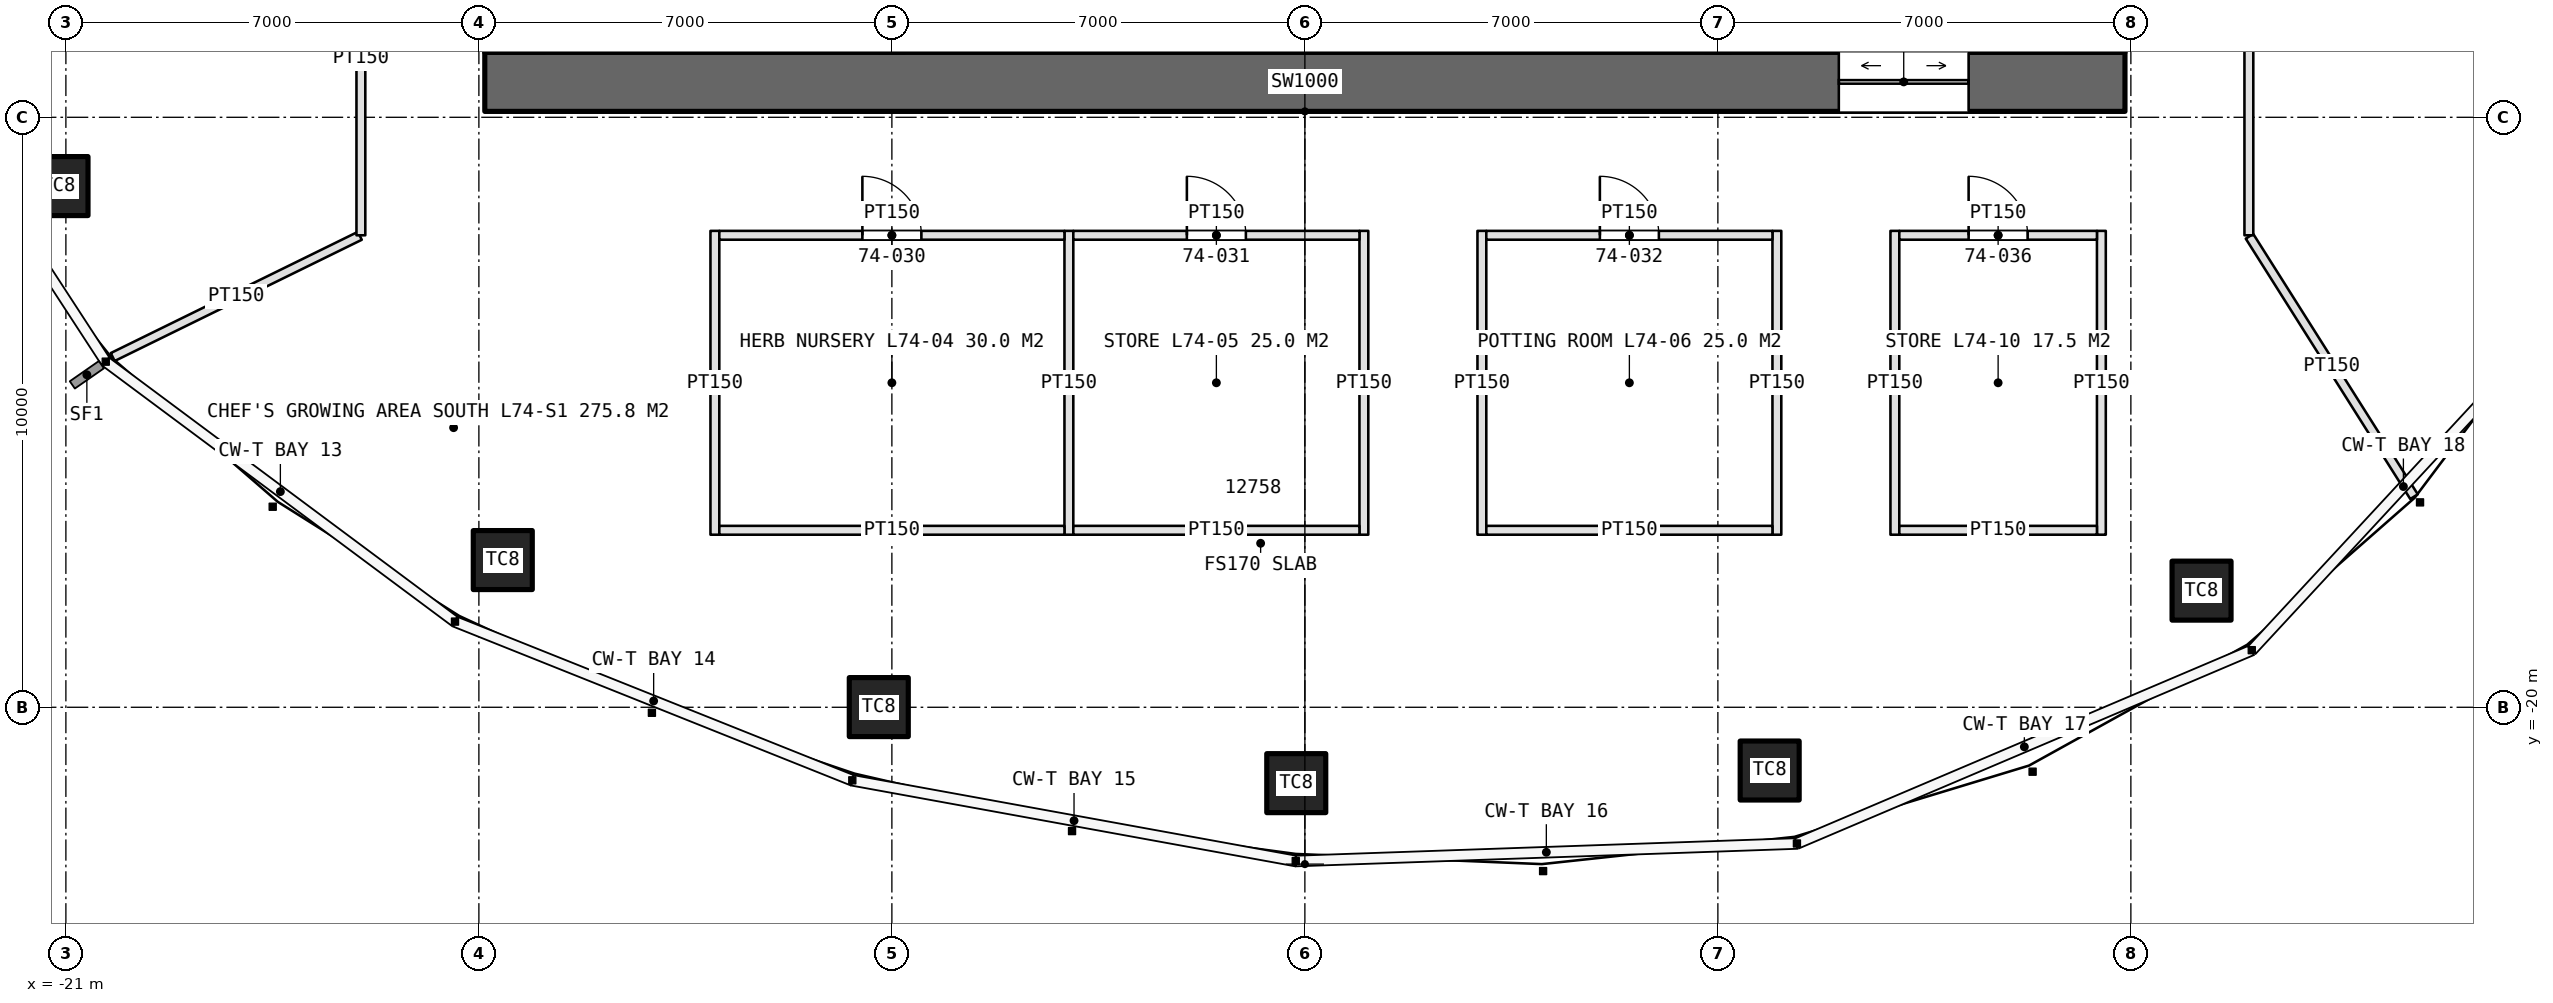
"""IFC4 building model, lengths in metres.
Left out: names, types, materials, properties, quantities, classifications, styles, units other than length and angle.
Written with IfcOpenShell. Run it as: python <this file> out.ifc"""

import sys

from ifc_helpers import new_model, si_unit, direction, frame, frame_2d, origin, origin_2d, place, context, subcontext, project, spatial, rectangle, extrude, element, fill, save


model = new_model("IFC4")
c1 = context("Model", 3, precision=1e-05, world=origin(), true_north=direction((0.0, 1.0)))
c2 = subcontext(c1, "Body", "Model", "MODEL_VIEW")
j1 = project(units=[si_unit("LENGTHUNIT", "METRE"), si_unit("PLANEANGLEUNIT", "RADIAN")], contexts=[c1])
p1 = place(None, origin())
s1 = spatial("IfcSite", under=j1, at=p1, CompositionType="ELEMENT")
p2 = place(p1, origin())
s2 = spatial("IfcBuilding", under=s1, at=p2, CompositionType="ELEMENT")
p3 = place(p2, frame((0.0, 0.0, 330.0)))
s3 = spatial("IfcBuildingStorey", under=s2, at=p3, CompositionType="ELEMENT", Elevation=330.0)
p4 = place(p3, frame((-13.9, -9.4, 0.0), z_axis=(0.0, 0.0, 1.0), x_axis=(1.0, 0.0, 0.0)))
e1 = element("IfcWall", 1, at=p4, inside=s3, PredefinedType="SHEAR", context=c2, shape_type="SweptSolid", body=[
    extrude(rectangle(XDim=27.8, YDim=1.0, at=frame_2d((13.9, 0.0))), origin(), (0.0, 0.0, 1.0), 4.2),
])
p5 = place(p4, frame((22.95, 0.0, 0.0)))
e2 = element("IfcOpeningElement", 2, at=p5, cuts=e1, PredefinedType="OPENING", context=c2, shape_type="SweptSolid", body=[
    extrude(rectangle(XDim=2.2, YDim=2.7, at=frame_2d((1.1, 1.35))), frame((0.0, 0.51, 0.0), z_axis=(0.0, -1.0, 0.0), x_axis=(1.0, 0.0, 0.0)), (0.0, 0.0, 1.0), 1.02),
])
for number, where, z_axis, x_axis in (
    (3, (-21.125, -11.166, 0.0), (0.0, 0.0, 1.0), (1.0, 0.0, 0.0)),
    (4, (-13.595, -17.505, 0.0), (0.0, 0.0, 1.0), (1.0, 0.0, 0.0)),
    (5, (-7.222, -19.997, 0.0), (0.0, 0.0, 1.0), (1.0, 0.0, 0.0)),
    (6, (-0.146, -21.286, 0.0), (0.0, 0.0, 1.0), (1.0, 0.0, 0.0)),
    (7, (7.878, -21.072, 0.0), (0.0, 0.0, 1.0), (1.0, 0.0, 0.0)),
    (8, (15.198, -18.023, 0.0), (0.0, 0.0, 1.0), (1.0, 0.0, 0.0)),
):
    element("IfcColumn", number, at=place(p3, frame(where, z_axis=z_axis, x_axis=x_axis)), inside=s3, PredefinedType="COLUMN", context=c2, shape_type="SweptSolid", body=[
        extrude(rectangle(XDim=1.0, YDim=1.0, at=origin_2d()), origin(), (0.0, 0.0, 1.0), 4.2),
    ])
for number, where, z_axis, x_axis in (
    (9, (-4.2, -4.7, 0.0), (0.0, 0.0, 1.0), (0.0, -1.0, 0.0)),
    (10, (-1.4, -4.7, 0.0), (0.0, 0.0, 1.0), (0.0, -1.0, 0.0)),
    (11, (1.4, -4.7, 0.0), (0.0, 0.0, 1.0), (0.0, -1.0, 0.0)),
    (12, (4.2, -4.7, 0.0), (0.0, 0.0, 1.0), (0.0, -1.0, 0.0)),
):
    element("IfcWall", number, at=place(p3, frame(where, z_axis=z_axis, x_axis=x_axis)), inside=s3, PredefinedType="PARTITIONING", context=c2, shape_type="SweptSolid", body=[
        extrude(rectangle(XDim=4.2, YDim=0.2, at=frame_2d((2.1, 0.0))), origin(), (0.0, 0.0, 1.0), 4.2),
    ])
for number, where, z_axis, x_axis in (
    (13, (-10.0, -11.925, 0.0), (0.0, 0.0, 1.0), (0.0, -1.0, 0.0)),
    (14, (-4.0, -11.925, 0.0), (0.0, 0.0, 1.0), (0.0, -1.0, 0.0)),
    (15, (1.0, -11.925, 0.0), (0.0, 0.0, 1.0), (0.0, -1.0, 0.0)),
):
    element("IfcWall", number, at=place(p3, frame(where, z_axis=z_axis, x_axis=x_axis)), inside=s3, PredefinedType="PARTITIONING", context=c2, shape_type="SweptSolid", body=[
        extrude(rectangle(XDim=5.15, YDim=0.15, at=frame_2d((2.575, 0.0))), origin(), (0.0, 0.0, 1.0), 3.0),
    ])
p6 = place(p3, frame((-9.925, -12.0, 0.0), z_axis=(0.0, 0.0, 1.0), x_axis=(1.0, 0.0, 0.0)))
e16 = element("IfcWall", 16, at=p6, inside=s3, PredefinedType="PARTITIONING", context=c2, shape_type="SweptSolid", body=[
    extrude(rectangle(XDim=5.85, YDim=0.15, at=frame_2d((2.925, 0.0))), origin(), (0.0, 0.0, 1.0), 3.0),
])
p7 = place(p6, frame((2.425, 0.0, 0.0)))
e17 = element("IfcOpeningElement", 17, at=p7, cuts=e16, PredefinedType="OPENING", context=c2, shape_type="SweptSolid", body=[
    extrude(rectangle(XDim=1.0, YDim=2.2, at=frame_2d((0.5, 1.1))), frame((0.0, 0.085, 0.0), z_axis=(0.0, -1.0, 0.0), x_axis=(1.0, 0.0, 0.0)), (0.0, 0.0, 1.0), 0.17),
])
p8 = place(p3, frame((-9.925, -17.0, 0.0), z_axis=(0.0, 0.0, 1.0), x_axis=(1.0, 0.0, 0.0)))
e18 = element("IfcWall", 18, at=p8, inside=s3, PredefinedType="PARTITIONING", context=c2, shape_type="SweptSolid", body=[
    extrude(rectangle(XDim=5.85, YDim=0.15, at=frame_2d((2.925, 0.0))), origin(), (0.0, 0.0, 1.0), 3.0),
])
p9 = place(p3, frame((-3.925, -12.0, 0.0), z_axis=(0.0, 0.0, 1.0), x_axis=(1.0, 0.0, 0.0)))
e19 = element("IfcWall", 19, at=p9, inside=s3, PredefinedType="PARTITIONING", context=c2, shape_type="SweptSolid", body=[
    extrude(rectangle(XDim=4.85, YDim=0.15, at=frame_2d((2.425, 0.0))), origin(), (0.0, 0.0, 1.0), 3.0),
])
p10 = place(p9, frame((1.925, 0.0, 0.0)))
e20 = element("IfcOpeningElement", 20, at=p10, cuts=e19, PredefinedType="OPENING", context=c2, shape_type="SweptSolid", body=[
    extrude(rectangle(XDim=1.0, YDim=2.2, at=frame_2d((0.5, 1.1))), frame((0.0, 0.085, 0.0), z_axis=(0.0, -1.0, 0.0), x_axis=(1.0, 0.0, 0.0)), (0.0, 0.0, 1.0), 0.17),
])
p11 = place(p3, frame((-3.925, -17.0, 0.0), z_axis=(0.0, 0.0, 1.0), x_axis=(1.0, 0.0, 0.0)))
e21 = element("IfcWall", 21, at=p11, inside=s3, PredefinedType="PARTITIONING", context=c2, shape_type="SweptSolid", body=[
    extrude(rectangle(XDim=4.85, YDim=0.15, at=frame_2d((2.425, 0.0))), origin(), (0.0, 0.0, 1.0), 3.0),
])
for number, where, z_axis, x_axis in (
    (22, (3.0, -11.925, 0.0), (0.0, 0.0, 1.0), (0.0, -1.0, 0.0)),
    (23, (8.0, -11.925, 0.0), (0.0, 0.0, 1.0), (0.0, -1.0, 0.0)),
):
    element("IfcWall", number, at=place(p3, frame(where, z_axis=z_axis, x_axis=x_axis)), inside=s3, PredefinedType="PARTITIONING", context=c2, shape_type="SweptSolid", body=[
        extrude(rectangle(XDim=5.15, YDim=0.15, at=frame_2d((2.575, 0.0))), origin(), (0.0, 0.0, 1.0), 3.0),
    ])
p12 = place(p3, frame((3.075, -12.0, 0.0), z_axis=(0.0, 0.0, 1.0), x_axis=(1.0, 0.0, 0.0)))
e24 = element("IfcWall", 24, at=p12, inside=s3, PredefinedType="PARTITIONING", context=c2, shape_type="SweptSolid", body=[
    extrude(rectangle(XDim=4.85, YDim=0.15, at=frame_2d((2.425, 0.0))), origin(), (0.0, 0.0, 1.0), 3.0),
])
p13 = place(p12, frame((1.925, 0.0, 0.0)))
e25 = element("IfcOpeningElement", 25, at=p13, cuts=e24, PredefinedType="OPENING", context=c2, shape_type="SweptSolid", body=[
    extrude(rectangle(XDim=1.0, YDim=2.2, at=frame_2d((0.5, 1.1))), frame((0.0, 0.085, 0.0), z_axis=(0.0, -1.0, 0.0), x_axis=(1.0, 0.0, 0.0)), (0.0, 0.0, 1.0), 0.17),
])
p14 = place(p3, frame((3.075, -17.0, 0.0), z_axis=(0.0, 0.0, 1.0), x_axis=(1.0, 0.0, 0.0)))
e26 = element("IfcWall", 26, at=p14, inside=s3, PredefinedType="PARTITIONING", context=c2, shape_type="SweptSolid", body=[
    extrude(rectangle(XDim=4.85, YDim=0.15, at=frame_2d((2.425, 0.0))), origin(), (0.0, 0.0, 1.0), 3.0),
])
for number, where, z_axis, x_axis in (
    (27, (10.0, -11.925, 0.0), (0.0, 0.0, 1.0), (0.0, -1.0, 0.0)),
    (28, (13.5, -11.925, 0.0), (0.0, 0.0, 1.0), (0.0, -1.0, 0.0)),
):
    element("IfcWall", number, at=place(p3, frame(where, z_axis=z_axis, x_axis=x_axis)), inside=s3, PredefinedType="PARTITIONING", context=c2, shape_type="SweptSolid", body=[
        extrude(rectangle(XDim=5.15, YDim=0.15, at=frame_2d((2.575, 0.0))), origin(), (0.0, 0.0, 1.0), 3.0),
    ])
p15 = place(p3, frame((10.075, -12.0, 0.0), z_axis=(0.0, 0.0, 1.0), x_axis=(1.0, 0.0, 0.0)))
e29 = element("IfcWall", 29, at=p15, inside=s3, PredefinedType="PARTITIONING", context=c2, shape_type="SweptSolid", body=[
    extrude(rectangle(XDim=3.35, YDim=0.15, at=frame_2d((1.675, 0.0))), origin(), (0.0, 0.0, 1.0), 3.0),
])
p16 = place(p15, frame((1.175, 0.0, 0.0)))
e30 = element("IfcOpeningElement", 30, at=p16, cuts=e29, PredefinedType="OPENING", context=c2, shape_type="SweptSolid", body=[
    extrude(rectangle(XDim=1.0, YDim=2.2, at=frame_2d((0.5, 1.1))), frame((0.0, 0.085, 0.0), z_axis=(0.0, -1.0, 0.0), x_axis=(1.0, 0.0, 0.0)), (0.0, 0.0, 1.0), 0.17),
])
p17 = place(p3, frame((10.075, -17.0, 0.0), z_axis=(0.0, 0.0, 1.0), x_axis=(1.0, 0.0, 0.0)))
e31 = element("IfcWall", 31, at=p17, inside=s3, PredefinedType="PARTITIONING", context=c2, shape_type="SweptSolid", body=[
    extrude(rectangle(XDim=3.35, YDim=0.15, at=frame_2d((1.675, 0.0))), origin(), (0.0, 0.0, 1.0), 3.0),
])
p18 = place(p3, frame((-16.018, -12.009, 0.0), z_axis=(0.0, 0.0, 1.0), x_axis=(-0.897771840996, -0.440460805879, 0.0)))
e32 = element("IfcWall", 32, at=p18, inside=s3, PredefinedType="PARTITIONING", context=c2, shape_type="SweptSolid", body=[
    extrude(rectangle(XDim=4.666, YDim=0.15, at=frame_2d((2.333, 0.0))), origin(), (0.0, 0.0, 1.0), 3.0),
])
p19 = place(p3, frame((16.011, -12.017, 0.0), z_axis=(0.0, 0.0, 1.0), x_axis=(0.53415837449, -0.845384427916, 0.0)))
e33 = element("IfcWall", 33, at=p19, inside=s3, PredefinedType="PARTITIONING", context=c2, shape_type="SweptSolid", body=[
    extrude(rectangle(XDim=5.22, YDim=0.15, at=frame_2d((2.61, 0.0))), origin(), (0.0, 0.0, 1.0), 3.0),
])
p20 = place(p3, frame((16.0, -12.0, 0.0), z_axis=(0.0, 0.0, 1.0), x_axis=(0.0, 1.0, 0.0)))
e34 = element("IfcWall", 34, at=p20, inside=s3, PredefinedType="PARTITIONING", context=c2, shape_type="SweptSolid", body=[
    extrude(rectangle(XDim=7.0, YDim=0.15, at=frame_2d((3.5, 0.0))), origin(), (0.0, 0.0, 1.0), 3.0),
])
p21 = place(p20, frame((4.9, 0.0, 0.0)))
e35 = element("IfcOpeningElement", 35, at=p21, cuts=e34, PredefinedType="OPENING", context=c2, shape_type="SweptSolid", body=[
    extrude(rectangle(XDim=1.6, YDim=2.4, at=frame_2d((0.8, 1.2))), frame((0.0, 0.085, 0.0), z_axis=(0.0, -1.0, 0.0), x_axis=(1.0, 0.0, 0.0)), (0.0, 0.0, 1.0), 0.17),
])
p22 = place(p3, frame((-16.0, -6.0, 0.0), z_axis=(0.0, 0.0, 1.0), x_axis=(0.0, -1.0, 0.0)))
e36 = element("IfcWall", 36, at=p22, inside=s3, PredefinedType="PARTITIONING", context=c2, shape_type="SweptSolid", body=[
    extrude(rectangle(XDim=6.0, YDim=0.15, at=frame_2d((3.0, 0.0))), origin(), (0.0, 0.0, 1.0), 3.0),
])
p23 = place(p22, frame((0.4, 0.0, 0.0)))
e37 = element("IfcOpeningElement", 37, at=p23, cuts=e36, PredefinedType="OPENING", context=c2, shape_type="SweptSolid", body=[
    extrude(rectangle(XDim=1.6, YDim=2.4, at=frame_2d((0.8, 1.2))), frame((0.0, 0.085, 0.0), z_axis=(0.0, -1.0, 0.0), x_axis=(1.0, 0.0, 0.0)), (0.0, 0.0, 1.0), 0.17),
])
p24 = place(p5, origin())
e38 = element("IfcDoor", 38, at=p24, inside=s3, OperationType="DOUBLE_DOOR_SLIDING", PredefinedType="DOOR", context=c2, shape_type="SweptSolid", body=[
    extrude(rectangle(XDim=2.2, YDim=2.7, at=frame_2d((1.1, 1.35))), frame((0.0, 0.025, 0.0), z_axis=(0.0, -1.0, 0.0), x_axis=(1.0, 0.0, 0.0)), (0.0, 0.0, 1.0), 0.05),
])
fill(e2, e38)
p25 = place(p7, origin())
e39 = element("IfcDoor", 39, at=p25, inside=s3, OperationType="SINGLE_SWING_LEFT", PredefinedType="DOOR", context=c2, shape_type="SweptSolid", body=[
    extrude(rectangle(XDim=1.0, YDim=2.2, at=frame_2d((0.5, 1.1))), frame((0.0, 0.025, 0.0), z_axis=(0.0, -1.0, 0.0), x_axis=(1.0, 0.0, 0.0)), (0.0, 0.0, 1.0), 0.05),
])
fill(e17, e39)
p26 = place(p10, origin())
e40 = element("IfcDoor", 40, at=p26, inside=s3, OperationType="SINGLE_SWING_LEFT", PredefinedType="DOOR", context=c2, shape_type="SweptSolid", body=[
    extrude(rectangle(XDim=1.0, YDim=2.2, at=frame_2d((0.5, 1.1))), frame((0.0, 0.025, 0.0), z_axis=(0.0, -1.0, 0.0), x_axis=(1.0, 0.0, 0.0)), (0.0, 0.0, 1.0), 0.05),
])
fill(e20, e40)
p27 = place(p13, origin())
e41 = element("IfcDoor", 41, at=p27, inside=s3, OperationType="SINGLE_SWING_LEFT", PredefinedType="DOOR", context=c2, shape_type="SweptSolid", body=[
    extrude(rectangle(XDim=1.0, YDim=2.2, at=frame_2d((0.5, 1.1))), frame((0.0, 0.025, 0.0), z_axis=(0.0, -1.0, 0.0), x_axis=(1.0, 0.0, 0.0)), (0.0, 0.0, 1.0), 0.05),
])
fill(e25, e41)
p28 = place(p16, origin())
e42 = element("IfcDoor", 42, at=p28, inside=s3, OperationType="SINGLE_SWING_LEFT", PredefinedType="DOOR", context=c2, shape_type="SweptSolid", body=[
    extrude(rectangle(XDim=1.0, YDim=2.2, at=frame_2d((0.5, 1.1))), frame((0.0, 0.025, 0.0), z_axis=(0.0, -1.0, 0.0), x_axis=(1.0, 0.0, 0.0)), (0.0, 0.0, 1.0), 0.05),
])
fill(e30, e42)
save(model, sys.argv[1])
